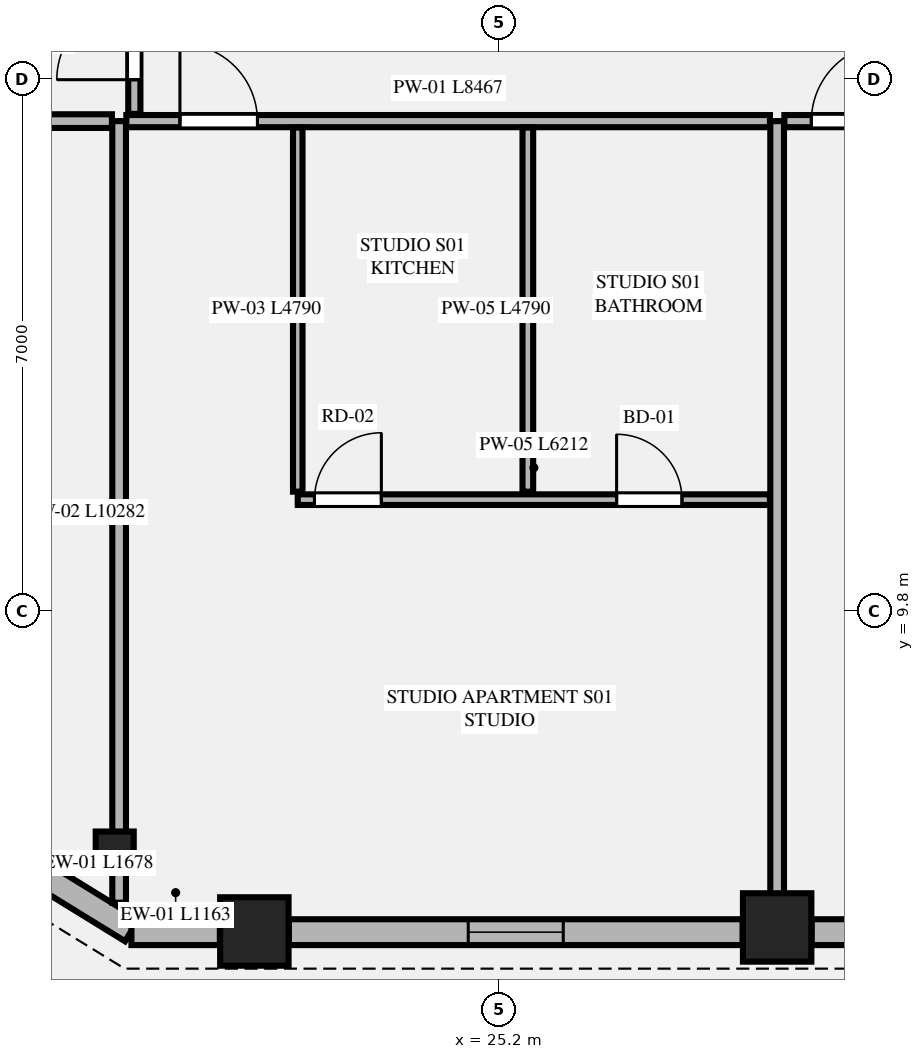
"""IFC4 building model, lengths in metres.
Left out: names, types, materials, properties, quantities, classifications, styles, units other than length and angle.
Written with IfcOpenShell. Run it as: python <this file> out.ifc"""

import sys

from ifc_helpers import new_model, si_unit, direction, frame, frame_2d, origin, origin_2d, place, context, subcontext, project, spatial, rectangle, extrude, element, fill, save


model = new_model("IFC4")
c1 = context("Model", 3, precision=1e-05, world=origin(), true_north=direction((0.0, 1.0)))
c2 = subcontext(c1, "Body", "Model", "MODEL_VIEW")
j1 = project(units=[si_unit("LENGTHUNIT", "METRE"), si_unit("PLANEANGLEUNIT", "RADIAN")], contexts=[c1])
p1 = place(None, origin())
s1 = spatial("IfcSite", under=j1, at=p1, CompositionType="ELEMENT")
p2 = place(p1, origin())
s2 = spatial("IfcBuilding", under=s1, at=p2, CompositionType="ELEMENT")
p3 = place(p2, frame((0.0, 0.0, 171.9)))
s3 = spatial("IfcBuildingStorey", under=s2, at=p3, CompositionType="ELEMENT", Elevation=171.9)
for number, where, z_axis, x_axis in (
    (1, (21.979, 5.589, 0.0), (0.0, 0.0, 1.0), (1.0, 0.0, 0.0)),
    (2, (28.857, 5.642, 0.0), (0.0, 0.0, 1.0), (1.0, 0.0, 0.0)),
):
    element("IfcColumn", number, at=place(p3, frame(where, z_axis=z_axis, x_axis=x_axis)), inside=s3, PredefinedType="COLUMN", context=c2, shape_type="SweptSolid", body=[
        extrude(rectangle(XDim=0.9, YDim=0.9, at=origin_2d()), origin(), (0.0, 0.0, 1.0), 3.55),
    ])
p4 = place(p3, frame((20.142, 6.654, 0.0), z_axis=(0.0, 0.0, 1.0), x_axis=(0.865230187018, -0.501374833306, 0.0)))
e3 = element("IfcColumn", 3, at=p4, inside=s3, PredefinedType="PILASTER", context=c2, shape_type="SweptSolid", body=[
    extrude(rectangle(XDim=0.5, YDim=0.35, at=origin_2d()), origin(), (0.0, 0.0, 1.0), 3.55),
])
p5 = place(p3, frame((18.938, 6.484, 0.0), z_axis=(0.0, 0.0, 1.0), x_axis=(0.851778214877, -0.523902541185, 0.0)))
e4 = element("IfcWall", 4, at=p5, inside=s3, PredefinedType="STANDARD", context=c2, shape_type="SweptSolid", body=[
    extrude(rectangle(XDim=1.678, YDim=0.34, at=frame_2d((0.839, 0.0))), origin(), (0.0, 0.0, 1.0), 3.35),
])
p6 = place(p3, frame((20.362, 5.58, 0.0), z_axis=(0.0, 0.0, 1.0), x_axis=(1.0, 0.0, 0.0)))
e5 = element("IfcWall", 5, at=p6, inside=s3, PredefinedType="STANDARD", context=c2, shape_type="SweptSolid", body=[
    extrude(rectangle(XDim=1.163, YDim=0.34, at=frame_2d((0.582, 0.0))), origin(), (0.0, 0.0, 1.0), 3.35),
])
p7 = place(p3, frame((22.433, 5.58, 0.0), z_axis=(0.0, 0.0, 1.0), x_axis=(1.0, 0.0, 0.0)))
e6 = element("IfcWall", 6, at=p7, inside=s3, PredefinedType="STANDARD", context=c2, shape_type="SweptSolid", body=[
    extrude(rectangle(XDim=5.97, YDim=0.34, at=frame_2d((2.985, 0.0))), origin(), (0.0, 0.0, 1.0), 2.883),
])
p8 = place(p7, frame((2.36, 0.0, 0.75)))
e7 = element("IfcOpeningElement", 7, at=p8, cuts=e6, PredefinedType="OPENING", context=c2, shape_type="SweptSolid", body=[
    extrude(rectangle(XDim=1.25, YDim=1.95, at=frame_2d((0.625, 0.975))), frame((0.0, 0.18, 0.0), z_axis=(0.0, -1.0, 0.0), x_axis=(1.0, 0.0, 0.0)), (0.0, 0.0, 1.0), 0.36),
])
p9 = place(p3, frame((29.311, 5.58, 0.0), z_axis=(0.0, 0.0, 1.0), x_axis=(1.0, 0.0, 0.0)))
e8 = element("IfcWall", 8, at=p9, inside=s3, PredefinedType="STANDARD", context=c2, shape_type="SweptSolid", body=[
    extrude(rectangle(XDim=6.178, YDim=0.34, at=frame_2d((3.089, 0.0))), origin(), (0.0, 0.0, 1.0), 2.883),
])
p10 = place(p9, frame((2.339, 0.0, 0.0)))
e9 = element("IfcOpeningElement", 9, at=p10, cuts=e8, PredefinedType="OPENING", context=c2, shape_type="SweptSolid", body=[
    extrude(rectangle(XDim=1.5, YDim=2.3, at=frame_2d((0.75, 1.15))), frame((0.0, 0.18, 0.0), z_axis=(0.0, -1.0, 0.0), x_axis=(1.0, 0.0, 0.0)), (0.0, 0.0, 1.0), 0.36),
])
p11 = place(p3, frame((20.2, 5.968, 0.0), z_axis=(0.0, 0.0, 1.0), x_axis=(0.0, 1.0, 0.0)))
e10 = element("IfcWall", 10, at=p11, inside=s3, PredefinedType="PARTITIONING", context=c2, shape_type="SweptSolid", body=[
    extrude(rectangle(XDim=10.282, YDim=0.18, at=frame_2d((5.141, 0.0))), origin(), (0.0, 0.0, 1.0), 3.35),
])
p12 = place(p3, frame((28.857, 5.755, 0.0), z_axis=(0.0, 0.0, 1.0), x_axis=(0.0, 1.0, 0.0)))
e11 = element("IfcWall", 11, at=p12, inside=s3, PredefinedType="PARTITIONING", context=c2, shape_type="SweptSolid", body=[
    extrude(rectangle(XDim=10.495, YDim=0.18, at=frame_2d((5.248, 0.0))), origin(), (0.0, 0.0, 1.0), 2.807),
])
p13 = place(p3, frame((20.295, 16.25, 0.0), z_axis=(0.0, 0.0, 1.0), x_axis=(1.0, 0.0, 0.0)))
e12 = element("IfcWall", 12, at=p13, inside=s3, PredefinedType="PARTITIONING", context=c2, shape_type="SweptSolid", body=[
    extrude(rectangle(XDim=8.467, YDim=0.16, at=frame_2d((4.233, 0.0))), origin(), (0.0, 0.0, 1.0), 3.35),
])
p14 = place(p13, frame((0.705, 0.0, 0.0)))
e13 = element("IfcOpeningElement", 13, at=p14, cuts=e12, PredefinedType="OPENING", context=c2, shape_type="SweptSolid", body=[
    extrude(rectangle(XDim=1.02, YDim=2.25, at=frame_2d((0.51, 1.125))), frame((0.0, 0.09, 0.0), z_axis=(0.0, -1.0, 0.0), x_axis=(1.0, 0.0, 0.0)), (0.0, 0.0, 1.0), 0.18),
])
p15 = place(p3, frame((22.55, 11.375, 0.0), z_axis=(0.0, 0.0, 1.0), x_axis=(0.0, 1.0, 0.0)))
e14 = element("IfcWall", 14, at=p15, inside=s3, PredefinedType="PARTITIONING", context=c2, shape_type="SweptSolid", body=[
    extrude(rectangle(XDim=4.79, YDim=0.125, at=frame_2d((2.395, 0.0))), origin(), (0.0, 0.0, 1.0), 2.807),
])
p16 = place(p3, frame((22.55, 11.27, 0.0), z_axis=(0.0, 0.0, 1.0), x_axis=(1.0, 0.0, 0.0)))
e15 = element("IfcWall", 15, at=p16, inside=s3, PredefinedType="PLUMBINGWALL", context=c2, shape_type="SweptSolid", body=[
    extrude(rectangle(XDim=6.212, YDim=0.14, at=frame_2d((3.106, 0.0))), origin(), (0.0, 0.0, 1.0), 3.35),
])
p17 = place(p16, frame((4.195, 0.0, 0.0)))
e16 = element("IfcOpeningElement", 16, at=p17, cuts=e15, PredefinedType="OPENING", context=c2, shape_type="SweptSolid", body=[
    extrude(rectangle(XDim=0.86, YDim=2.1, at=frame_2d((0.43, 1.05))), frame((0.0, 0.08, 0.0), z_axis=(0.0, -1.0, 0.0), x_axis=(1.0, 0.0, 0.0)), (0.0, 0.0, 1.0), 0.16),
])
p18 = place(p16, frame((0.22, 0.0, 0.0)))
e17 = element("IfcOpeningElement", 17, at=p18, cuts=e15, PredefinedType="OPENING", context=c2, shape_type="SweptSolid", body=[
    extrude(rectangle(XDim=0.88, YDim=2.15, at=frame_2d((0.44, 1.075))), frame((0.0, 0.08, 0.0), z_axis=(0.0, -1.0, 0.0), x_axis=(1.0, 0.0, 0.0)), (0.0, 0.0, 1.0), 0.16),
])
p19 = place(p3, frame((25.577, 11.375, 0.0), z_axis=(0.0, 0.0, 1.0), x_axis=(0.0, 1.0, 0.0)))
e18 = element("IfcWall", 18, at=p19, inside=s3, PredefinedType="PLUMBINGWALL", context=c2, shape_type="SweptSolid", body=[
    extrude(rectangle(XDim=4.79, YDim=0.14, at=frame_2d((2.395, 0.0))), origin(), (0.0, 0.0, 1.0), 3.35),
])
p20 = place(p3, frame((28.952, 16.25, 0.0), z_axis=(0.0, 0.0, 1.0), x_axis=(1.0, 0.0, 0.0)))
e19 = element("IfcWall", 19, at=p20, inside=s3, PredefinedType="PARTITIONING", context=c2, shape_type="SweptSolid", body=[
    extrude(rectangle(XDim=6.896, YDim=0.16, at=frame_2d((3.448, 0.0))), origin(), (0.0, 0.0, 1.0), 3.35),
])
p21 = place(p20, frame((0.355, 0.0, 0.0)))
e20 = element("IfcOpeningElement", 20, at=p21, cuts=e19, PredefinedType="OPENING", context=c2, shape_type="SweptSolid", body=[
    extrude(rectangle(XDim=1.02, YDim=2.25, at=frame_2d((0.51, 1.125))), frame((0.0, 0.09, 0.0), z_axis=(0.0, -1.0, 0.0), x_axis=(1.0, 0.0, 0.0)), (0.0, 0.0, 1.0), 0.18),
])
p22 = place(p3, frame((14.211, 16.25, 0.0), z_axis=(0.0, 0.0, 1.0), x_axis=(1.0, 0.0, 0.0)))
e21 = element("IfcWall", 21, at=p22, inside=s3, PredefinedType="PARTITIONING", context=c2, shape_type="SweptSolid", body=[
    extrude(rectangle(XDim=5.894, YDim=0.18, at=frame_2d((2.947, 0.0))), origin(), (0.0, 0.0, 1.0), 3.35),
])
p23 = place(p3, frame((20.4, 16.345, 0.0), z_axis=(0.0, 0.0, 1.0), x_axis=(0.0, 1.0, 0.0)))
e22 = element("IfcWall", 22, at=p23, inside=s3, PredefinedType="PARTITIONING", context=c2, shape_type="SweptSolid", body=[
    extrude(rectangle(XDim=9.26, YDim=0.16, at=frame_2d((4.63, 0.0))), origin(), (0.0, 0.0, 1.0), 3.35),
])
p24 = place(p23, frame((0.45, 0.0, 0.0)))
e23 = element("IfcOpeningElement", 23, at=p24, cuts=e22, PredefinedType="OPENING", context=c2, shape_type="SweptSolid", body=[
    extrude(rectangle(XDim=1.02, YDim=2.25, at=frame_2d((0.51, 1.125))), frame((0.0, 0.09, 0.0), z_axis=(0.0, -1.0, 0.0), x_axis=(1.0, 0.0, 0.0)), (0.0, 0.0, 1.0), 0.18),
])
p25 = place(p8, origin())
e24 = element("IfcWindow", 24, at=p25, inside=s3, PartitioningType="SINGLE_PANEL", PredefinedType="WINDOW", context=c2, shape_type="SweptSolid", body=[
    extrude(rectangle(XDim=1.25, YDim=1.95, at=frame_2d((0.625, 0.975))), frame((0.0, 0.03, 0.0), z_axis=(0.0, -1.0, 0.0), x_axis=(1.0, 0.0, 0.0)), (0.0, 0.0, 1.0), 0.06),
])
fill(e7, e24)
p26 = place(p17, origin())
e25 = element("IfcDoor", 25, at=p26, inside=s3, OperationType="SINGLE_SWING_LEFT", PredefinedType="DOOR", context=c2, shape_type="SweptSolid", body=[
    extrude(rectangle(XDim=0.86, YDim=2.1, at=frame_2d((0.43, 1.05))), frame((0.0, 0.025, 0.0), z_axis=(0.0, -1.0, 0.0), x_axis=(1.0, 0.0, 0.0)), (0.0, 0.0, 1.0), 0.05),
])
fill(e16, e25)
p27 = place(p14, origin())
e26 = element("IfcDoor", 26, at=p27, inside=s3, OperationType="SINGLE_SWING_LEFT", PredefinedType="DOOR", context=c2, shape_type="SweptSolid", body=[
    extrude(rectangle(XDim=1.02, YDim=2.25, at=frame_2d((0.51, 1.125))), frame((0.0, 0.025, 0.0), z_axis=(0.0, -1.0, 0.0), x_axis=(1.0, 0.0, 0.0)), (0.0, 0.0, 1.0), 0.05),
])
fill(e13, e26)
p28 = place(p18, origin())
e27 = element("IfcDoor", 27, at=p28, inside=s3, OperationType="SINGLE_SWING_RIGHT", PredefinedType="DOOR", context=c2, shape_type="SweptSolid", body=[
    extrude(rectangle(XDim=0.88, YDim=2.15, at=frame_2d((0.44, 1.075))), frame((0.0, 0.025, 0.0), z_axis=(0.0, -1.0, 0.0), x_axis=(1.0, 0.0, 0.0)), (0.0, 0.0, 1.0), 0.05),
])
fill(e17, e27)
p29 = place(p21, origin())
e28 = element("IfcDoor", 28, at=p29, inside=s3, OperationType="SINGLE_SWING_RIGHT", PredefinedType="DOOR", context=c2, shape_type="SweptSolid", body=[
    extrude(rectangle(XDim=1.02, YDim=2.25, at=frame_2d((0.51, 1.125))), frame((0.0, 0.025, 0.0), z_axis=(0.0, -1.0, 0.0), x_axis=(1.0, 0.0, 0.0)), (0.0, 0.0, 1.0), 0.05),
])
fill(e20, e28)
p30 = place(p24, origin())
e29 = element("IfcDoor", 29, at=p30, inside=s3, OperationType="SINGLE_SWING_LEFT", PredefinedType="DOOR", context=c2, shape_type="SweptSolid", body=[
    extrude(rectangle(XDim=1.02, YDim=2.25, at=frame_2d((0.51, 1.125))), frame((0.0, 0.025, 0.0), z_axis=(0.0, -1.0, 0.0), x_axis=(1.0, 0.0, 0.0)), (0.0, 0.0, 1.0), 0.05),
])
fill(e23, e29)
save(model, sys.argv[1])
